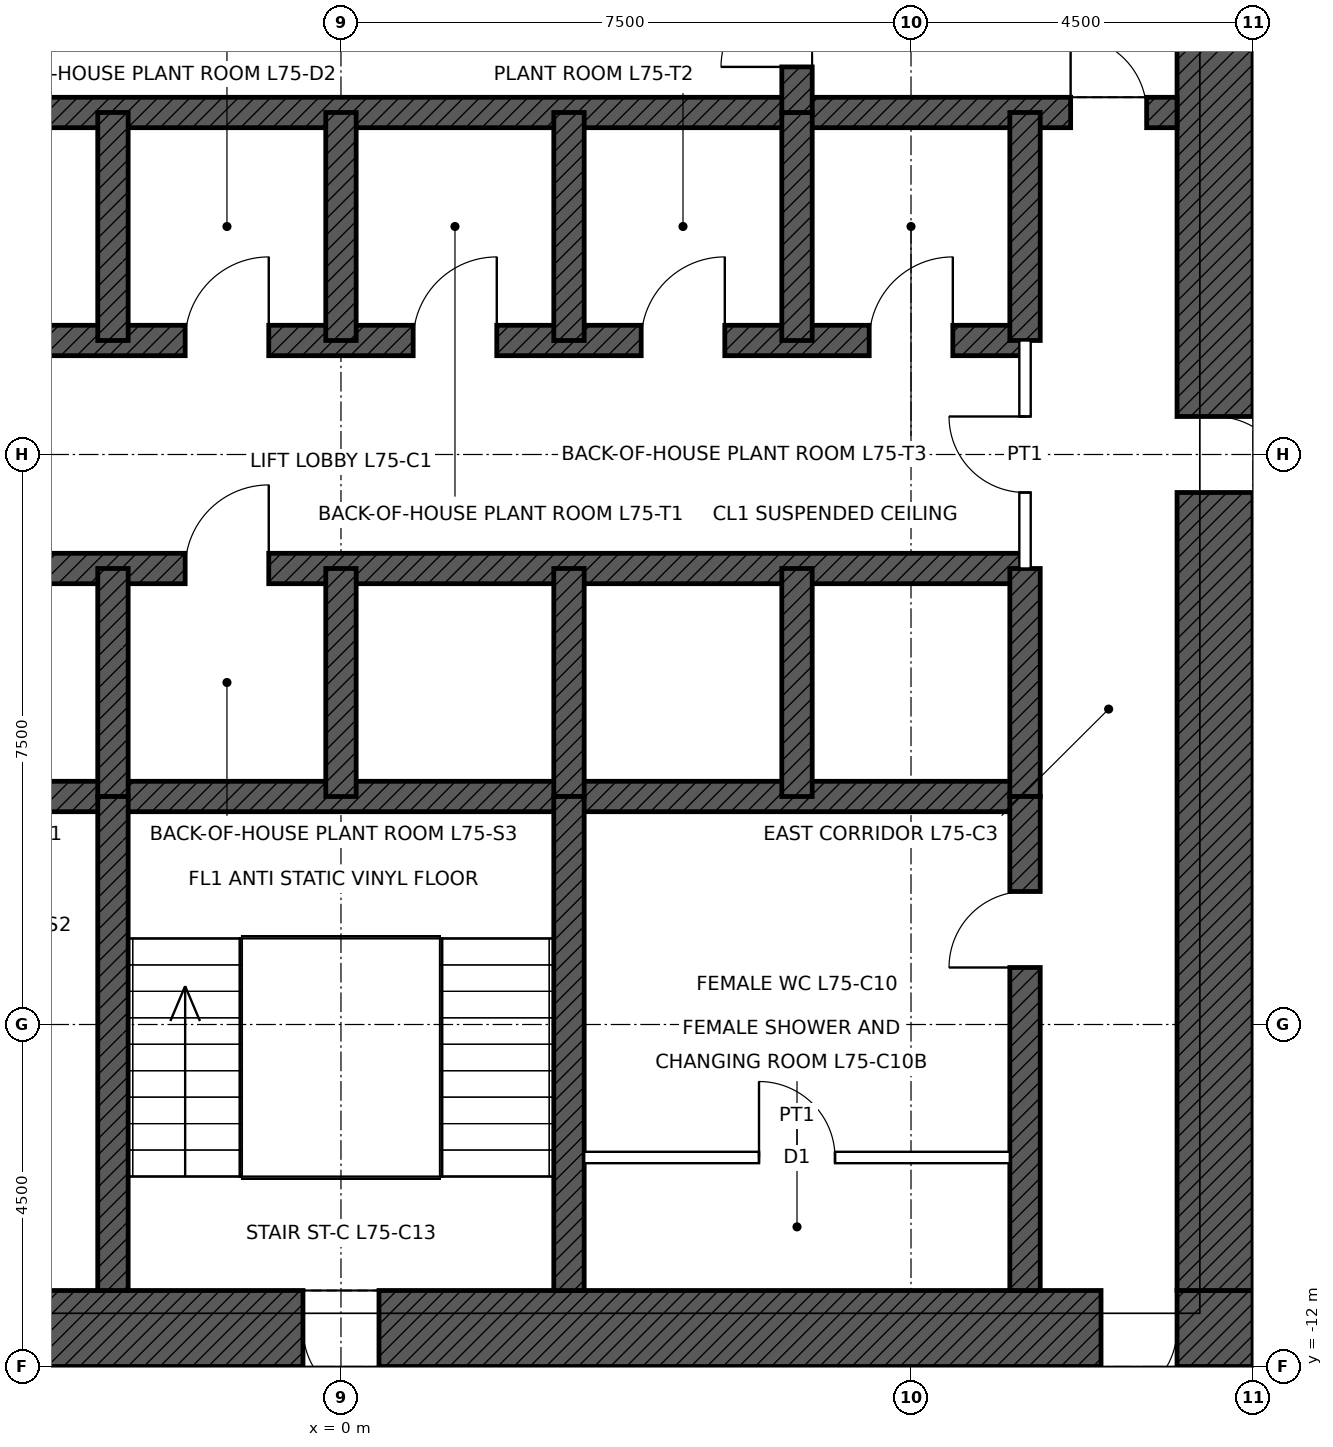
"""IFC4 building model, lengths in metres.
Left out: names, types, materials, properties, quantities, classifications, styles, units other than length and angle.
Written with IfcOpenShell. Run it as: python <this file> out.ifc"""

import sys

from ifc_helpers import new_model, si_unit, direction, frame, frame_2d, origin, place, context, subcontext, project, spatial, rectangle, extrude, element, fill, save


model = new_model("IFC4")
c1 = context("Model", 3, precision=1e-05, world=origin(), true_north=direction((0.0, 1.0)))
c2 = subcontext(c1, "Body", "Model", "MODEL_VIEW")
j1 = project(units=[si_unit("LENGTHUNIT", "METRE"), si_unit("PLANEANGLEUNIT", "RADIAN")], contexts=[c1])
p1 = place(None, origin())
s1 = spatial("IfcSite", under=j1, at=p1, CompositionType="ELEMENT")
p2 = place(p1, origin())
s2 = spatial("IfcBuilding", under=s1, at=p2, CompositionType="ELEMENT")
p3 = place(p2, frame((0.0, 0.0, 335.9)))
s3 = spatial("IfcBuildingStorey", under=s2, at=p3, CompositionType="ELEMENT", Elevation=335.9)
p4 = place(p3, frame((12.0, -11.5, 0.0), z_axis=(0.0, 0.0, 1.0), x_axis=(-1.0, 0.0, 0.0)))
e1 = element("IfcWall", 1, at=p4, inside=s3, PredefinedType="SHEAR", context=c2, shape_type="SweptSolid", body=[
    extrude(rectangle(XDim=24.0, YDim=1.0, at=frame_2d((12.0, 0.0))), origin(), (0.0, 0.0, 1.0), 6.0),
])
p5 = place(p4, frame((11.5, 0.0, 0.0)))
e2 = element("IfcOpeningElement", 2, at=p5, cuts=e1, PredefinedType="OPENING", context=c2, shape_type="SweptSolid", body=[
    extrude(rectangle(XDim=1.0, YDim=2.1, at=frame_2d((0.5, 1.05))), frame((0.0, 0.51, 0.0), z_axis=(0.0, -1.0, 0.0), x_axis=(1.0, 0.0, 0.0)), (0.0, 0.0, 1.0), 1.02),
])
p6 = place(p4, frame((1.0, 0.0, 0.0)))
e3 = element("IfcOpeningElement", 3, at=p6, cuts=e1, PredefinedType="OPENING", context=c2, shape_type="SweptSolid", body=[
    extrude(rectangle(XDim=1.0, YDim=2.4, at=frame_2d((0.5, 1.2))), frame((0.0, 0.51, 0.0), z_axis=(0.0, -1.0, 0.0), x_axis=(1.0, 0.0, 0.0)), (0.0, 0.0, 1.0), 1.02),
])
p7 = place(p3, frame((11.5, 11.0, 0.0), z_axis=(0.0, 0.0, 1.0), x_axis=(0.0, -1.0, 0.0)))
e4 = element("IfcWall", 4, at=p7, inside=s3, PredefinedType="SHEAR", context=c2, shape_type="SweptSolid", body=[
    extrude(rectangle(XDim=22.0, YDim=1.0, at=frame_2d((11.0, 0.0))), origin(), (0.0, 0.0, 1.0), 6.0),
])
p8 = place(p7, frame((10.5, 0.0, 0.0)))
e5 = element("IfcOpeningElement", 5, at=p8, cuts=e4, PredefinedType="OPENING", context=c2, shape_type="SweptSolid", body=[
    extrude(rectangle(XDim=1.0, YDim=2.4, at=frame_2d((0.5, 1.2))), frame((0.0, 0.51, 0.0), z_axis=(0.0, -1.0, 0.0), x_axis=(1.0, 0.0, 0.0)), (0.0, 0.0, 1.0), 1.02),
])
p9 = place(p3, frame((-11.0, 4.5, 0.0), z_axis=(0.0, 0.0, 1.0), x_axis=(1.0, 0.0, 0.0)))
e6 = element("IfcWall", 6, at=p9, inside=s3, PredefinedType="SHEAR", context=c2, shape_type="SweptSolid", body=[
    extrude(rectangle(XDim=22.0, YDim=0.4, at=frame_2d((11.0, 0.0))), origin(), (0.0, 0.0, 1.0), 6.0),
])
p10 = place(p9, frame((0.4, 0.0, 0.0)))
e7 = element("IfcOpeningElement", 7, at=p10, cuts=e6, PredefinedType="OPENING", context=c2, shape_type="SweptSolid", body=[
    extrude(rectangle(XDim=1.0, YDim=2.1, at=frame_2d((0.5, 1.05))), frame((0.0, 0.21, 0.0), z_axis=(0.0, -1.0, 0.0), x_axis=(1.0, 0.0, 0.0)), (0.0, 0.0, 1.0), 0.42),
])
p11 = place(p9, frame((20.6, 0.0, 0.0)))
e8 = element("IfcOpeningElement", 8, at=p11, cuts=e6, PredefinedType="OPENING", context=c2, shape_type="SweptSolid", body=[
    extrude(rectangle(XDim=1.0, YDim=2.1, at=frame_2d((0.5, 1.05))), frame((0.0, 0.21, 0.0), z_axis=(0.0, -1.0, 0.0), x_axis=(1.0, 0.0, 0.0)), (0.0, 0.0, 1.0), 0.42),
])
p12 = place(p3, frame((-9.0, 1.5, 0.0), z_axis=(0.0, 0.0, 1.0), x_axis=(1.0, 0.0, 0.0)))
e9 = element("IfcWall", 9, at=p12, inside=s3, PredefinedType="SHEAR", context=c2, shape_type="SweptSolid", body=[
    extrude(rectangle(XDim=18.0, YDim=0.4, at=frame_2d((9.0, 0.0))), origin(), (0.0, 0.0, 1.0), 6.0),
])
p13 = place(p12, frame((0.95, 0.0, 0.0)))
e10 = element("IfcOpeningElement", 10, at=p13, cuts=e9, PredefinedType="OPENING", context=c2, shape_type="SweptSolid", body=[
    extrude(rectangle(XDim=1.1, YDim=2.1, at=frame_2d((0.55, 1.05))), frame((0.0, 0.21, 0.0), z_axis=(0.0, -1.0, 0.0), x_axis=(1.0, 0.0, 0.0)), (0.0, 0.0, 1.0), 0.42),
])
p14 = place(p12, frame((3.95, 0.0, 0.0)))
e11 = element("IfcOpeningElement", 11, at=p14, cuts=e9, PredefinedType="OPENING", context=c2, shape_type="SweptSolid", body=[
    extrude(rectangle(XDim=1.1, YDim=2.1, at=frame_2d((0.55, 1.05))), frame((0.0, 0.21, 0.0), z_axis=(0.0, -1.0, 0.0), x_axis=(1.0, 0.0, 0.0)), (0.0, 0.0, 1.0), 0.42),
])
p15 = place(p12, frame((6.95, 0.0, 0.0)))
e12 = element("IfcOpeningElement", 12, at=p15, cuts=e9, PredefinedType="OPENING", context=c2, shape_type="SweptSolid", body=[
    extrude(rectangle(XDim=1.1, YDim=2.1, at=frame_2d((0.55, 1.05))), frame((0.0, 0.21, 0.0), z_axis=(0.0, -1.0, 0.0), x_axis=(1.0, 0.0, 0.0)), (0.0, 0.0, 1.0), 0.42),
])
p16 = place(p12, frame((9.95, 0.0, 0.0)))
e13 = element("IfcOpeningElement", 13, at=p16, cuts=e9, PredefinedType="OPENING", context=c2, shape_type="SweptSolid", body=[
    extrude(rectangle(XDim=1.1, YDim=2.1, at=frame_2d((0.55, 1.05))), frame((0.0, 0.21, 0.0), z_axis=(0.0, -1.0, 0.0), x_axis=(1.0, 0.0, 0.0)), (0.0, 0.0, 1.0), 0.42),
])
p17 = place(p12, frame((12.95, 0.0, 0.0)))
e14 = element("IfcOpeningElement", 14, at=p17, cuts=e9, PredefinedType="OPENING", context=c2, shape_type="SweptSolid", body=[
    extrude(rectangle(XDim=1.1, YDim=2.1, at=frame_2d((0.55, 1.05))), frame((0.0, 0.21, 0.0), z_axis=(0.0, -1.0, 0.0), x_axis=(1.0, 0.0, 0.0)), (0.0, 0.0, 1.0), 0.42),
])
p18 = place(p12, frame((15.95, 0.0, 0.0)))
e15 = element("IfcOpeningElement", 15, at=p18, cuts=e9, PredefinedType="OPENING", context=c2, shape_type="SweptSolid", body=[
    extrude(rectangle(XDim=1.1, YDim=2.1, at=frame_2d((0.55, 1.05))), frame((0.0, 0.21, 0.0), z_axis=(0.0, -1.0, 0.0), x_axis=(1.0, 0.0, 0.0)), (0.0, 0.0, 1.0), 0.42),
])
p19 = place(p3, frame((-9.0, -1.5, 0.0), z_axis=(0.0, 0.0, 1.0), x_axis=(1.0, 0.0, 0.0)))
e16 = element("IfcWall", 16, at=p19, inside=s3, PredefinedType="SHEAR", context=c2, shape_type="SweptSolid", body=[
    extrude(rectangle(XDim=18.0, YDim=0.4, at=frame_2d((9.0, 0.0))), origin(), (0.0, 0.0, 1.0), 6.0),
])
p20 = place(p19, frame((0.95, 0.0, 0.0)))
e17 = element("IfcOpeningElement", 17, at=p20, cuts=e16, PredefinedType="OPENING", context=c2, shape_type="SweptSolid", body=[
    extrude(rectangle(XDim=1.1, YDim=2.1, at=frame_2d((0.55, 1.05))), frame((0.0, 0.21, 0.0), z_axis=(0.0, -1.0, 0.0), x_axis=(1.0, 0.0, 0.0)), (0.0, 0.0, 1.0), 0.42),
])
p21 = place(p19, frame((3.95, 0.0, 0.0)))
e18 = element("IfcOpeningElement", 18, at=p21, cuts=e16, PredefinedType="OPENING", context=c2, shape_type="SweptSolid", body=[
    extrude(rectangle(XDim=1.1, YDim=2.1, at=frame_2d((0.55, 1.05))), frame((0.0, 0.21, 0.0), z_axis=(0.0, -1.0, 0.0), x_axis=(1.0, 0.0, 0.0)), (0.0, 0.0, 1.0), 0.42),
])
p22 = place(p19, frame((6.95, 0.0, 0.0)))
e19 = element("IfcOpeningElement", 19, at=p22, cuts=e16, PredefinedType="OPENING", context=c2, shape_type="SweptSolid", body=[
    extrude(rectangle(XDim=1.1, YDim=2.1, at=frame_2d((0.55, 1.05))), frame((0.0, 0.21, 0.0), z_axis=(0.0, -1.0, 0.0), x_axis=(1.0, 0.0, 0.0)), (0.0, 0.0, 1.0), 0.42),
])
p23 = place(p3, frame((-9.0, -4.5, 0.0), z_axis=(0.0, 0.0, 1.0), x_axis=(1.0, 0.0, 0.0)))
e20 = element("IfcWall", 20, at=p23, inside=s3, PredefinedType="SHEAR", context=c2, shape_type="SweptSolid", body=[
    extrude(rectangle(XDim=18.0, YDim=0.4, at=frame_2d((9.0, 0.0))), origin(), (0.0, 0.0, 1.0), 6.0),
])
for number, where, z_axis, x_axis in (
    (21, (9.0, 1.5, 0.0), (0.0, 0.0, 1.0), (0.0, 1.0, 0.0)),
    (22, (9.0, -4.5, 0.0), (0.0, 0.0, 1.0), (0.0, 1.0, 0.0)),
    (23, (-3.0, 1.5, 0.0), (0.0, 0.0, 1.0), (0.0, 1.0, 0.0)),
    (24, (0.0, 1.5, 0.0), (0.0, 0.0, 1.0), (0.0, 1.0, 0.0)),
    (25, (3.0, 1.5, 0.0), (0.0, 0.0, 1.0), (0.0, 1.0, 0.0)),
    (26, (6.0, 1.5, 0.0), (0.0, 0.0, 1.0), (0.0, 1.0, 0.0)),
    (27, (-3.0, -4.5, 0.0), (0.0, 0.0, 1.0), (0.0, 1.0, 0.0)),
    (28, (0.0, -4.5, 0.0), (0.0, 0.0, 1.0), (0.0, 1.0, 0.0)),
    (29, (3.0, -4.5, 0.0), (0.0, 0.0, 1.0), (0.0, 1.0, 0.0)),
    (30, (6.0, -4.5, 0.0), (0.0, 0.0, 1.0), (0.0, 1.0, 0.0)),
):
    element("IfcWall", number, at=place(p3, frame(where, z_axis=z_axis, x_axis=x_axis)), inside=s3, PredefinedType="SHEAR", context=c2, shape_type="SweptSolid", body=[
        extrude(rectangle(XDim=3.0, YDim=0.4, at=frame_2d((1.5, 0.0))), origin(), (0.0, 0.0, 1.0), 6.0),
    ])
p24 = place(p3, frame((6.0, 4.5, 0.0), z_axis=(0.0, 0.0, 1.0), x_axis=(0.0, 1.0, 0.0)))
e31 = element("IfcWall", 31, at=p24, inside=s3, PredefinedType="SHEAR", context=c2, shape_type="SweptSolid", body=[
    extrude(rectangle(XDim=6.5, YDim=0.4, at=frame_2d((3.25, 0.0))), origin(), (0.0, 0.0, 1.0), 6.0),
])
p25 = place(p24, frame((0.6, 0.0, 0.0)))
e32 = element("IfcOpeningElement", 32, at=p25, cuts=e31, PredefinedType="OPENING", context=c2, shape_type="SweptSolid", body=[
    extrude(rectangle(XDim=1.0, YDim=2.1, at=frame_2d((0.5, 1.05))), frame((0.0, 0.21, 0.0), z_axis=(0.0, -1.0, 0.0), x_axis=(1.0, 0.0, 0.0)), (0.0, 0.0, 1.0), 0.42),
])
p26 = place(p3, frame((9.0, -11.0, 0.0), z_axis=(0.0, 0.0, 1.0), x_axis=(0.0, 1.0, 0.0)))
e33 = element("IfcWall", 33, at=p26, inside=s3, PredefinedType="SHEAR", context=c2, shape_type="SweptSolid", body=[
    extrude(rectangle(XDim=6.5, YDim=0.4, at=frame_2d((3.25, 0.0))), origin(), (0.0, 0.0, 1.0), 6.0),
])
p27 = place(p26, frame((4.25, 0.0, 0.0)))
e34 = element("IfcOpeningElement", 34, at=p27, cuts=e33, PredefinedType="OPENING", context=c2, shape_type="SweptSolid", body=[
    extrude(rectangle(XDim=1.0, YDim=2.1, at=frame_2d((0.5, 1.05))), frame((0.0, 0.21, 0.0), z_axis=(0.0, -1.0, 0.0), x_axis=(1.0, 0.0, 0.0)), (0.0, 0.0, 1.0), 0.42),
])
for number, where, z_axis, x_axis in (
    (35, (-3.0, -11.0, 0.0), (0.0, 0.0, 1.0), (0.0, 1.0, 0.0)),
    (36, (3.0, -11.0, 0.0), (0.0, 0.0, 1.0), (0.0, 1.0, 0.0)),
):
    element("IfcWall", number, at=place(p3, frame(where, z_axis=z_axis, x_axis=x_axis)), inside=s3, PredefinedType="SHEAR", context=c2, shape_type="SweptSolid", body=[
        extrude(rectangle(XDim=6.5, YDim=0.4, at=frame_2d((3.25, 0.0))), origin(), (0.0, 0.0, 1.0), 6.0),
    ])
p28 = place(p3, frame((3.2, -9.25, 0.0), z_axis=(0.0, 0.0, 1.0), x_axis=(1.0, 0.0, 0.0)))
e37 = element("IfcWall", 37, at=p28, inside=s3, PredefinedType="PARTITIONING", context=c2, shape_type="SweptSolid", body=[
    extrude(rectangle(XDim=5.6, YDim=0.15, at=frame_2d((2.8, 0.0))), origin(), (0.0, 0.0, 1.0), 5.75),
])
p29 = place(p28, frame((2.3, 0.0, 0.0)))
e38 = element("IfcOpeningElement", 38, at=p29, cuts=e37, PredefinedType="OPENING", context=c2, shape_type="SweptSolid", body=[
    extrude(rectangle(XDim=1.0, YDim=2.1, at=frame_2d((0.5, 1.05))), frame((0.0, 0.085, 0.0), z_axis=(0.0, -1.0, 0.0), x_axis=(1.0, 0.0, 0.0)), (0.0, 0.0, 1.0), 0.17),
])
p30 = place(p3, frame((9.0, -1.5, 0.0), z_axis=(0.0, 0.0, 1.0), x_axis=(0.0, 1.0, 0.0)))
e39 = element("IfcWall", 39, at=p30, inside=s3, PredefinedType="PARTITIONING", context=c2, shape_type="SweptSolid", body=[
    extrude(rectangle(XDim=3.0, YDim=0.15, at=frame_2d((1.5, 0.0))), origin(), (0.0, 0.0, 1.0), 5.75),
])
p31 = place(p30, frame((1.0, 0.0, 0.0)))
e40 = element("IfcOpeningElement", 40, at=p31, cuts=e39, PredefinedType="OPENING", context=c2, shape_type="SweptSolid", body=[
    extrude(rectangle(XDim=1.0, YDim=2.4, at=frame_2d((0.5, 1.2))), frame((0.0, 0.085, 0.0), z_axis=(0.0, -1.0, 0.0), x_axis=(1.0, 0.0, 0.0)), (0.0, 0.0, 1.0), 0.17),
])
p32 = place(p11, origin())
e41 = element("IfcDoor", 41, at=p32, inside=s3, OperationType="SINGLE_SWING_LEFT", PredefinedType="DOOR", context=c2, shape_type="SweptSolid", body=[
    extrude(rectangle(XDim=1.0, YDim=2.1, at=frame_2d((0.5, 1.05))), frame((0.0, 0.025, 0.0), z_axis=(0.0, -1.0, 0.0), x_axis=(1.0, 0.0, 0.0)), (0.0, 0.0, 1.0), 0.05),
])
fill(e8, e41)
p33 = place(p25, origin())
e42 = element("IfcDoor", 42, at=p33, inside=s3, OperationType="SINGLE_SWING_LEFT", PredefinedType="DOOR", context=c2, shape_type="SweptSolid", body=[
    extrude(rectangle(XDim=1.0, YDim=2.1, at=frame_2d((0.5, 1.05))), frame((0.0, 0.025, 0.0), z_axis=(0.0, -1.0, 0.0), x_axis=(1.0, 0.0, 0.0)), (0.0, 0.0, 1.0), 0.05),
])
fill(e32, e42)
p34 = place(p5, origin())
e43 = element("IfcDoor", 43, at=p34, inside=s3, OperationType="SINGLE_SWING_LEFT", PredefinedType="DOOR", context=c2, shape_type="SweptSolid", body=[
    extrude(rectangle(XDim=1.0, YDim=2.1, at=frame_2d((0.5, 1.05))), frame((0.0, 0.485, 0.0), z_axis=(0.0, -1.0, 0.0), x_axis=(1.0, 0.0, 0.0)), (0.0, 0.0, 1.0), 0.05),
])
fill(e2, e43)
p35 = place(p8, origin())
e44 = element("IfcDoor", 44, at=p35, inside=s3, OperationType="SINGLE_SWING_RIGHT", PredefinedType="DOOR", context=c2, shape_type="SweptSolid", body=[
    extrude(rectangle(XDim=1.0, YDim=2.4, at=frame_2d((0.5, 1.2))), frame((0.0, 0.485, 0.0), z_axis=(0.0, -1.0, 0.0), x_axis=(1.0, 0.0, 0.0)), (0.0, 0.0, 1.0), 0.05),
])
fill(e5, e44)
p36 = place(p6, origin())
e45 = element("IfcDoor", 45, at=p36, inside=s3, OperationType="SINGLE_SWING_RIGHT", PredefinedType="DOOR", context=c2, shape_type="SweptSolid", body=[
    extrude(rectangle(XDim=1.0, YDim=2.4, at=frame_2d((0.5, 1.2))), frame((0.0, 0.485, 0.0), z_axis=(0.0, -1.0, 0.0), x_axis=(1.0, 0.0, 0.0)), (0.0, 0.0, 1.0), 0.05),
])
fill(e3, e45)
p37 = place(p27, origin())
e46 = element("IfcDoor", 46, at=p37, inside=s3, OperationType="SINGLE_SWING_LEFT", PredefinedType="DOOR", context=c2, shape_type="SweptSolid", body=[
    extrude(rectangle(XDim=1.0, YDim=2.1, at=frame_2d((0.5, 1.05))), frame((0.0, 0.025, 0.0), z_axis=(0.0, -1.0, 0.0), x_axis=(1.0, 0.0, 0.0)), (0.0, 0.0, 1.0), 0.05),
])
fill(e34, e46)
p38 = place(p29, origin())
e47 = element("IfcDoor", 47, at=p38, inside=s3, OperationType="SINGLE_SWING_LEFT", PredefinedType="DOOR", context=c2, shape_type="SweptSolid", body=[
    extrude(rectangle(XDim=1.0, YDim=2.1, at=frame_2d((0.5, 1.05))), frame((0.0, 0.025, 0.0), z_axis=(0.0, -1.0, 0.0), x_axis=(1.0, 0.0, 0.0)), (0.0, 0.0, 1.0), 0.05),
])
fill(e38, e47)
p39 = place(p31, origin())
e48 = element("IfcDoor", 48, at=p39, inside=s3, OperationType="SINGLE_SWING_RIGHT", PredefinedType="DOOR", context=c2, shape_type="SweptSolid", body=[
    extrude(rectangle(XDim=1.0, YDim=2.4, at=frame_2d((0.5, 1.2))), frame((0.0, 0.025, 0.0), z_axis=(0.0, -1.0, 0.0), x_axis=(1.0, 0.0, 0.0)), (0.0, 0.0, 1.0), 0.05),
])
fill(e40, e48)
p40 = place(p15, origin())
e49 = element("IfcDoor", 49, at=p40, inside=s3, OperationType="SINGLE_SWING_RIGHT", PredefinedType="DOOR", context=c2, shape_type="SweptSolid", body=[
    extrude(rectangle(XDim=1.1, YDim=2.1, at=frame_2d((0.55, 1.05))), frame((0.0, 0.025, 0.0), z_axis=(0.0, -1.0, 0.0), x_axis=(1.0, 0.0, 0.0)), (0.0, 0.0, 1.0), 0.05),
])
fill(e12, e49)
p41 = place(p16, origin())
e50 = element("IfcDoor", 50, at=p41, inside=s3, OperationType="SINGLE_SWING_RIGHT", PredefinedType="DOOR", context=c2, shape_type="SweptSolid", body=[
    extrude(rectangle(XDim=1.1, YDim=2.1, at=frame_2d((0.55, 1.05))), frame((0.0, 0.025, 0.0), z_axis=(0.0, -1.0, 0.0), x_axis=(1.0, 0.0, 0.0)), (0.0, 0.0, 1.0), 0.05),
])
fill(e13, e50)
p42 = place(p17, origin())
e51 = element("IfcDoor", 51, at=p42, inside=s3, OperationType="SINGLE_SWING_RIGHT", PredefinedType="DOOR", context=c2, shape_type="SweptSolid", body=[
    extrude(rectangle(XDim=1.1, YDim=2.1, at=frame_2d((0.55, 1.05))), frame((0.0, 0.025, 0.0), z_axis=(0.0, -1.0, 0.0), x_axis=(1.0, 0.0, 0.0)), (0.0, 0.0, 1.0), 0.05),
])
fill(e14, e51)
p43 = place(p18, origin())
e52 = element("IfcDoor", 52, at=p43, inside=s3, OperationType="SINGLE_SWING_RIGHT", PredefinedType="DOOR", context=c2, shape_type="SweptSolid", body=[
    extrude(rectangle(XDim=1.1, YDim=2.1, at=frame_2d((0.55, 1.05))), frame((0.0, 0.025, 0.0), z_axis=(0.0, -1.0, 0.0), x_axis=(1.0, 0.0, 0.0)), (0.0, 0.0, 1.0), 0.05),
])
fill(e15, e52)
p44 = place(p22, origin())
e53 = element("IfcDoor", 53, at=p44, inside=s3, OperationType="SINGLE_SWING_RIGHT", PredefinedType="DOOR", context=c2, shape_type="SweptSolid", body=[
    extrude(rectangle(XDim=1.1, YDim=2.1, at=frame_2d((0.55, 1.05))), frame((0.0, 0.025, 0.0), z_axis=(0.0, -1.0, 0.0), x_axis=(1.0, 0.0, 0.0)), (0.0, 0.0, 1.0), 0.05),
])
fill(e19, e53)
save(model, sys.argv[1])
